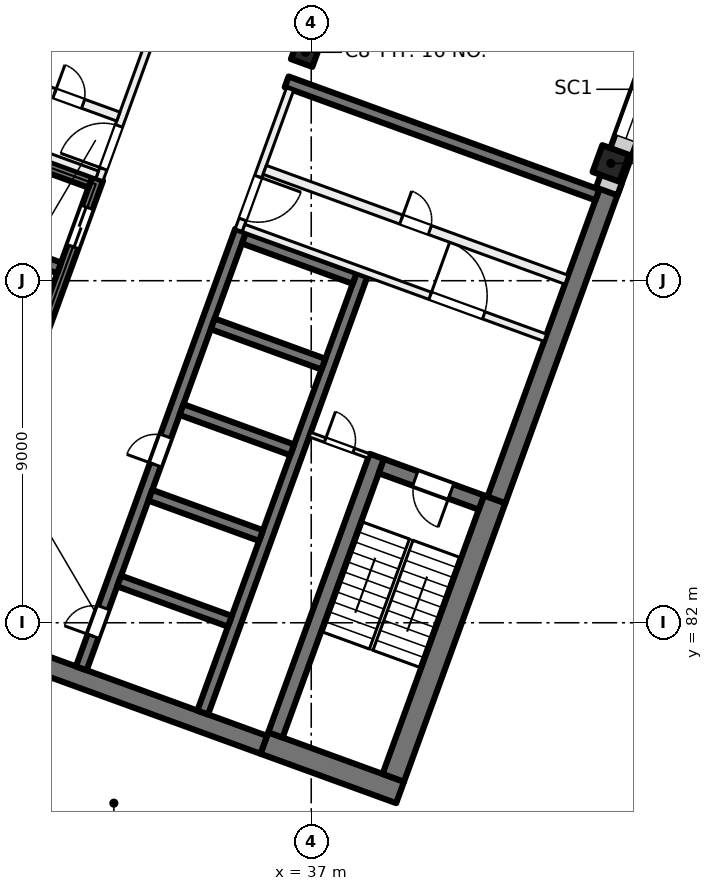
"""IFC4 building model, lengths in metres.
Left out: names, types, materials, properties, quantities, classifications, styles, units other than length and angle.
Written with IfcOpenShell. Run it as: python <this file> out.ifc"""

import sys

from ifc_helpers import new_model, si_unit, direction, frame, frame_2d, origin, origin_2d, place, context, subcontext, project, spatial, rectangle, extrude, element, fill, save


model = new_model("IFC4")
c1 = context("Model", 3, precision=1e-05, world=origin(), true_north=direction((0.0, 1.0)))
c2 = subcontext(c1, "Body", "Model", "MODEL_VIEW")
j1 = project(units=[si_unit("LENGTHUNIT", "METRE"), si_unit("PLANEANGLEUNIT", "RADIAN")], contexts=[c1])
p1 = place(None, origin())
s1 = spatial("IfcSite", under=j1, at=p1, CompositionType="ELEMENT")
p2 = place(p1, origin())
s2 = spatial("IfcBuilding", under=s1, at=p2, CompositionType="ELEMENT")
p3 = place(p2, frame((0.0, 0.0, 224.0)))
s3 = spatial("IfcBuildingStorey", under=s2, at=p3, CompositionType="ELEMENT", Elevation=224.0)
p4 = place(p3, frame((36.849, 97.011, 0.0), z_axis=(0.0, 0.0, 1.0), x_axis=(-0.342020143326, -0.939692620786, 0.0)))
e1 = element("IfcColumn", 1, at=p4, inside=s3, PredefinedType="COLUMN", context=c2, shape_type="SweptSolid", body=[
    extrude(rectangle(XDim=0.6, YDim=0.6, at=origin_2d()), origin(), (0.0, 0.0, 1.0), 4.0),
])
p5 = place(p3, frame((44.884, 94.087, 0.0), z_axis=(0.0, 0.0, 1.0), x_axis=(-0.342020143326, -0.939692620786, 0.0)))
e2 = element("IfcColumn", 2, at=p5, inside=s3, PredefinedType="COLUMN", context=c2, shape_type="SweptSolid", body=[
    extrude(rectangle(XDim=0.75, YDim=0.75, at=origin_2d()), origin(), (0.0, 0.0, 1.0), 4.0),
])
p6 = place(p3, frame((39.338, 77.535, 0.0), z_axis=(0.0, 0.0, 1.0), x_axis=(-0.939701471648, 0.341995824804, 0.0)))
e3 = element("IfcWall", 3, at=p6, inside=s3, PredefinedType="SHEAR", context=c2, shape_type="SweptSolid", body=[
    extrude(rectangle(XDim=3.8, YDim=0.6, at=frame_2d((1.9, 0.0))), origin(), (0.0, 0.0, 1.0), 4.0),
])
p7 = place(p3, frame((35.75, 78.788, 0.0), z_axis=(0.0, 0.0, 1.0), x_axis=(-0.939692894512, 0.342019391267, 0.0)))
e4 = element("IfcWall", 4, at=p7, inside=s3, PredefinedType="SHEAR", context=c2, shape_type="SweptSolid", body=[
    extrude(rectangle(XDim=14.4, YDim=0.5, at=frame_2d((7.2, 0.0))), origin(), (0.0, 0.0, 1.0), 4.0),
])
p8 = place(p3, frame((39.159, 77.92, 0.0), z_axis=(0.0, 0.0, 1.0), x_axis=(0.342016982193, 0.939693771338, 0.0)))
e5 = element("IfcWall", 5, at=p8, inside=s3, PredefinedType="SHEAR", context=c2, shape_type="SweptSolid", body=[
    extrude(rectangle(XDim=7.8, YDim=0.6, at=frame_2d((3.9, 0.0))), origin(), (0.0, 0.0, 1.0), 4.0),
])
p9 = place(p3, frame((41.874, 85.232, 0.0), z_axis=(0.0, 0.0, 1.0), x_axis=(0.342020437038, 0.939692513883, 0.0)))
e6 = element("IfcWall", 6, at=p9, inside=s3, PredefinedType="SHEAR", context=c2, shape_type="SweptSolid", body=[
    extrude(rectangle(XDim=8.975, YDim=0.5, at=frame_2d((4.487, 0.0))), origin(), (0.0, 0.0, 1.0), 4.0),
])
p10 = place(p3, frame((36.058, 79.048, 0.0), z_axis=(0.0, 0.0, 1.0), x_axis=(0.342016982193, 0.939693771338, 0.0)))
e7 = element("IfcWall", 7, at=p10, inside=s3, PredefinedType="SHEAR", context=c2, shape_type="SweptSolid", body=[
    extrude(rectangle(XDim=7.8, YDim=0.4, at=frame_2d((3.9, 0.0))), origin(), (0.0, 0.0, 1.0), 4.0),
])
p11 = place(p3, frame((41.476, 85.164, 0.0), z_axis=(0.0, 0.0, 1.0), x_axis=(-0.939678810556, 0.342058084236, 0.0)))
e8 = element("IfcWall", 8, at=p11, inside=s3, PredefinedType="SHEAR", context=c2, shape_type="SweptSolid", body=[
    extrude(rectangle(XDim=2.8, YDim=0.4, at=frame_2d((1.4, 0.0))), origin(), (0.0, 0.0, 1.0), 4.0),
])
p12 = place(p11, frame((0.85, 0.0, 0.0)))
e9 = element("IfcOpeningElement", 9, at=p12, cuts=e8, PredefinedType="OPENING", context=c2, shape_type="SweptSolid", body=[
    extrude(rectangle(XDim=1.0, YDim=2.1, at=frame_2d((0.5, 1.05))), frame((0.0, 0.21, 0.0), z_axis=(0.0, -1.0, 0.0), x_axis=(1.0, 0.0, 0.0)), (0.0, 0.0, 1.0), 0.42),
])
p13 = place(p3, frame((30.949, 80.801, 0.0), z_axis=(0.0, 0.0, 1.0), x_axis=(0.342016684409, 0.939693879721, 0.0)))
e10 = element("IfcWall", 10, at=p13, inside=s3, PredefinedType="SHEAR", context=c2, shape_type="SweptSolid", body=[
    extrude(rectangle(XDim=12.25, YDim=0.3, at=frame_2d((6.125, 0.0))), origin(), (0.0, 0.0, 1.0), 4.0),
])
p14 = place(p13, frame((0.9, 0.0, 0.0)))
e11 = element("IfcOpeningElement", 11, at=p14, cuts=e10, PredefinedType="OPENING", context=c2, shape_type="SweptSolid", body=[
    extrude(rectangle(XDim=0.8, YDim=2.1, at=frame_2d((0.4, 1.05))), frame((0.0, 0.16, 0.0), z_axis=(0.0, -1.0, 0.0), x_axis=(1.0, 0.0, 0.0)), (0.0, 0.0, 1.0), 0.32),
])
p15 = place(p13, frame((5.7, 0.0, 0.0)))
e12 = element("IfcOpeningElement", 12, at=p15, cuts=e10, PredefinedType="OPENING", context=c2, shape_type="SweptSolid", body=[
    extrude(rectangle(XDim=0.8, YDim=2.1, at=frame_2d((0.4, 1.05))), frame((0.0, 0.16, 0.0), z_axis=(0.0, -1.0, 0.0), x_axis=(1.0, 0.0, 0.0)), (0.0, 0.0, 1.0), 0.32),
])
p16 = place(p3, frame((34.144, 79.638, 0.0), z_axis=(0.0, 0.0, 1.0), x_axis=(0.342016684409, 0.939693879721, 0.0)))
e13 = element("IfcWall", 13, at=p16, inside=s3, PredefinedType="SHEAR", context=c2, shape_type="SweptSolid", body=[
    extrude(rectangle(XDim=12.25, YDim=0.3, at=frame_2d((6.125, 0.0))), origin(), (0.0, 0.0, 1.0), 4.0),
])
p17 = place(p3, frame((34.858, 82.039, 0.0), z_axis=(0.0, 0.0, 1.0), x_axis=(-0.939689908313, 0.342027595692, 0.0)))
e14 = element("IfcWall", 14, at=p17, inside=s3, PredefinedType="SHEAR", context=c2, shape_type="SweptSolid", body=[
    extrude(rectangle(XDim=3.1, YDim=0.3, at=frame_2d((1.55, 0.0))), origin(), (0.0, 0.0, 1.0), 4.0),
])
p18 = place(p3, frame((35.679, 84.294, 0.0), z_axis=(0.0, 0.0, 1.0), x_axis=(-0.939706007505, 0.341983361377, 0.0)))
e15 = element("IfcWall", 15, at=p18, inside=s3, PredefinedType="SHEAR", context=c2, shape_type="SweptSolid", body=[
    extrude(rectangle(XDim=3.1, YDim=0.3, at=frame_2d((1.55, 0.0))), origin(), (0.0, 0.0, 1.0), 4.0),
])
for number, where, z_axis, x_axis in (
    (16, (36.5, 86.549, 0.0), (0.0, 0.0, 1.0), (-0.94, 0.342, 0.0)),
    (17, (37.321, 88.805, 0.0), (0.0, 0.0, 1.0), (-0.94, 0.342, 0.0)),
    (18, (38.142, 91.06, 0.0), (0.0, 0.0, 1.0), (-0.94, 0.342, 0.0)),
):
    element("IfcWall", number, at=place(p3, frame(where, z_axis=z_axis, x_axis=x_axis)), inside=s3, PredefinedType="SHEAR", context=c2, shape_type="SweptSolid", body=[
        extrude(rectangle(XDim=3.1, YDim=0.3, at=frame_2d((1.55, 0.0))), origin(), (0.0, 0.0, 1.0), 4.0),
    ])
p19 = place(p3, frame((27.191, 82.169, 0.0), z_axis=(0.0, 0.0, 1.0), x_axis=(0.342016684409, 0.939693879721, 0.0)))
e19 = element("IfcWall", 19, at=p19, inside=s3, PredefinedType="SHEAR", context=c2, shape_type="SweptSolid", body=[
    extrude(rectangle(XDim=12.25, YDim=0.3, at=frame_2d((6.125, 0.0))), origin(), (0.0, 0.0, 1.0), 4.0),
])
p20 = place(p19, frame((0.75, 0.0, 0.0)))
e20 = element("IfcOpeningElement", 20, at=p20, cuts=e19, PredefinedType="OPENING", context=c2, shape_type="SweptSolid", body=[
    extrude(rectangle(XDim=1.1, YDim=2.1, at=frame_2d((0.55, 1.05))), frame((0.0, 0.16, 0.0), z_axis=(0.0, -1.0, 0.0), x_axis=(1.0, 0.0, 0.0)), (0.0, 0.0, 1.0), 0.32),
])
p21 = place(p19, frame((3.15, 0.0, 0.0)))
e21 = element("IfcOpeningElement", 21, at=p21, cuts=e19, PredefinedType="OPENING", context=c2, shape_type="SweptSolid", body=[
    extrude(rectangle(XDim=1.1, YDim=2.1, at=frame_2d((0.55, 1.05))), frame((0.0, 0.16, 0.0), z_axis=(0.0, -1.0, 0.0), x_axis=(1.0, 0.0, 0.0)), (0.0, 0.0, 1.0), 0.32),
])
p22 = place(p19, frame((5.55, 0.0, 0.0)))
e22 = element("IfcOpeningElement", 22, at=p22, cuts=e19, PredefinedType="OPENING", context=c2, shape_type="SweptSolid", body=[
    extrude(rectangle(XDim=1.1, YDim=2.1, at=frame_2d((0.55, 1.05))), frame((0.0, 0.16, 0.0), z_axis=(0.0, -1.0, 0.0), x_axis=(1.0, 0.0, 0.0)), (0.0, 0.0, 1.0), 0.32),
])
p23 = place(p19, frame((10.35, 0.0, 0.0)))
e23 = element("IfcOpeningElement", 23, at=p23, cuts=e19, PredefinedType="OPENING", context=c2, shape_type="SweptSolid", body=[
    extrude(rectangle(XDim=1.1, YDim=2.1, at=frame_2d((0.55, 1.05))), frame((0.0, 0.16, 0.0), z_axis=(0.0, -1.0, 0.0), x_axis=(1.0, 0.0, 0.0)), (0.0, 0.0, 1.0), 0.32),
])
for number, where, z_axis, x_axis in (
    (24, (30.367, 91.336, 0.0), (0.0, 0.0, 1.0), (-0.94, 0.342, 0.0)),
    (25, (31.188, 93.591, 0.0), (0.0, 0.0, 1.0), (-0.94, 0.342, 0.0)),
):
    element("IfcWall", number, at=place(p3, frame(where, z_axis=z_axis, x_axis=x_axis)), inside=s3, PredefinedType="SHEAR", context=c2, shape_type="SweptSolid", body=[
        extrude(rectangle(XDim=3.1, YDim=0.3, at=frame_2d((1.55, 0.0))), origin(), (0.0, 0.0, 1.0), 4.0),
    ])
p24 = place(p3, frame((44.529, 93.258, 0.0), z_axis=(0.0, 0.0, 1.0), x_axis=(-0.9396917844, 0.342022441267, 0.0)))
e26 = element("IfcWall", 26, at=p24, inside=s3, PredefinedType="SHEAR", context=c2, shape_type="SweptSolid", body=[
    extrude(rectangle(XDim=8.7, YDim=0.3, at=frame_2d((4.35, 0.0))), origin(), (0.0, 0.0, 1.0), 4.0),
])
p25 = place(p3, frame((52.212, 113.783, 0.0), z_axis=(0.0, 0.0, 1.0), x_axis=(-0.34202521188, -0.939690775968, 0.0)))
e27 = element("IfcWall", 27, at=p25, inside=s3, PredefinedType="SOLIDWALL", context=c2, shape_type="SweptSolid", body=[
    extrude(rectangle(XDim=21.745, YDim=0.6, at=frame_2d((10.873, 0.0))), origin(), (0.0, 0.0, 1.0), 3.625),
])
p26 = place(p25, frame((3.765, 0.0, 0.9)))
e28 = element("IfcOpeningElement", 28, at=p26, cuts=e27, PredefinedType="OPENING", context=c2, shape_type="SweptSolid", body=[
    extrude(rectangle(XDim=3.0, YDim=2.4, at=frame_2d((1.5, 1.2))), frame((0.0, 0.31, 0.0), z_axis=(0.0, -1.0, 0.0), x_axis=(1.0, 0.0, 0.0)), (0.0, 0.0, 1.0), 0.62),
])
p27 = place(p25, frame((8.265, 0.0, 0.9)))
e29 = element("IfcOpeningElement", 29, at=p27, cuts=e27, PredefinedType="OPENING", context=c2, shape_type="SweptSolid", body=[
    extrude(rectangle(XDim=3.0, YDim=2.4, at=frame_2d((1.5, 1.2))), frame((0.0, 0.31, 0.0), z_axis=(0.0, -1.0, 0.0), x_axis=(1.0, 0.0, 0.0)), (0.0, 0.0, 1.0), 0.62),
])
p28 = place(p25, frame((12.765, 0.0, 0.9)))
e30 = element("IfcOpeningElement", 30, at=p28, cuts=e27, PredefinedType="OPENING", context=c2, shape_type="SweptSolid", body=[
    extrude(rectangle(XDim=3.0, YDim=2.4, at=frame_2d((1.5, 1.2))), frame((0.0, 0.31, 0.0), z_axis=(0.0, -1.0, 0.0), x_axis=(1.0, 0.0, 0.0)), (0.0, 0.0, 1.0), 0.62),
])
p29 = place(p25, frame((17.265, 0.0, 0.9)))
e31 = element("IfcOpeningElement", 31, at=p29, cuts=e27, PredefinedType="OPENING", context=c2, shape_type="SweptSolid", body=[
    extrude(rectangle(XDim=3.0, YDim=2.4, at=frame_2d((1.5, 1.2))), frame((0.0, 0.31, 0.0), z_axis=(0.0, -1.0, 0.0), x_axis=(1.0, 0.0, 0.0)), (0.0, 0.0, 1.0), 0.62),
])
p30 = place(p3, frame((31.427, 93.663, 0.0), z_axis=(0.0, 0.0, 1.0), x_axis=(0.342030870568, 0.93968871632, 0.0)))
e32 = element("IfcWall", 32, at=p30, inside=s3, PredefinedType="PARTITIONING", context=c2, shape_type="SweptSolid", body=[
    extrude(rectangle(XDim=3.95, YDim=0.2, at=frame_2d((1.975, 0.0))), origin(), (0.0, 0.0, 1.0), 3.625),
])
p31 = place(p30, frame((0.3, 0.0, 0.0)))
e33 = element("IfcOpeningElement", 33, at=p31, cuts=e32, PredefinedType="OPENING", context=c2, shape_type="SweptSolid", body=[
    extrude(rectangle(XDim=1.2, YDim=2.1, at=frame_2d((0.6, 1.05))), frame((0.0, 0.11, 0.0), z_axis=(0.0, -1.0, 0.0), x_axis=(1.0, 0.0, 0.0)), (0.0, 0.0, 1.0), 0.22),
])
p32 = place(p3, frame((23.427, 96.682, 0.0), z_axis=(0.0, 0.0, 1.0), x_axis=(0.939690465531, -0.342026064782, 0.0)))
e34 = element("IfcWall", 34, at=p32, inside=s3, PredefinedType="PARTITIONING", context=c2, shape_type="SweptSolid", body=[
    extrude(rectangle(XDim=8.45, YDim=0.2, at=frame_2d((4.225, 0.0))), origin(), (0.0, 0.0, 1.0), 3.625),
])
p33 = place(p32, frame((1.725, 0.0, 0.0)))
e35 = element("IfcOpeningElement", 35, at=p33, cuts=e34, PredefinedType="OPENING", context=c2, shape_type="SweptSolid", body=[
    extrude(rectangle(XDim=1.5, YDim=2.1, at=frame_2d((0.75, 1.05))), frame((0.0, 0.11, 0.0), z_axis=(0.0, -1.0, 0.0), x_axis=(1.0, 0.0, 0.0)), (0.0, 0.0, 1.0), 0.22),
])
p34 = place(p3, frame((23.983, 98.208, 0.0), z_axis=(0.0, 0.0, 1.0), x_axis=(0.939699751196, -0.342000552051, 0.0)))
e36 = element("IfcWall", 36, at=p34, inside=s3, PredefinedType="PARTITIONING", context=c2, shape_type="SweptSolid", body=[
    extrude(rectangle(XDim=8.45, YDim=0.25, at=frame_2d((4.225, 0.0))), origin(), (0.0, 0.0, 1.0), 3.625),
])
p35 = place(p34, frame((6.665, 0.0, 0.0)))
e37 = element("IfcOpeningElement", 37, at=p35, cuts=e36, PredefinedType="OPENING", context=c2, shape_type="SweptSolid", body=[
    extrude(rectangle(XDim=0.8, YDim=2.1, at=frame_2d((0.4, 1.05))), frame((0.0, 0.135, 0.0), z_axis=(0.0, -1.0, 0.0), x_axis=(1.0, 0.0, 0.0)), (0.0, 0.0, 1.0), 0.27),
])
p36 = place(p34, frame((2.39, 0.0, 0.0)))
e38 = element("IfcOpeningElement", 38, at=p36, cuts=e36, PredefinedType="OPENING", context=c2, shape_type="SweptSolid", body=[
    extrude(rectangle(XDim=0.8, YDim=2.1, at=frame_2d((0.4, 1.05))), frame((0.0, 0.135, 0.0), z_axis=(0.0, -1.0, 0.0), x_axis=(1.0, 0.0, 0.0)), (0.0, 0.0, 1.0), 0.27),
])
p37 = place(p3, frame((36.443, 96.041, 0.0), z_axis=(0.0, 0.0, 1.0), x_axis=(-0.341996156931, -0.939701350773, 0.0)))
e39 = element("IfcWall", 39, at=p37, inside=s3, PredefinedType="PARTITIONING", context=c2, shape_type="SweptSolid", body=[
    extrude(rectangle(XDim=3.95, YDim=0.2, at=frame_2d((1.975, 0.0))), origin(), (0.0, 0.0, 1.0), 3.625),
])
p38 = place(p37, frame((2.45, 0.0, 0.0)))
e40 = element("IfcOpeningElement", 40, at=p38, cuts=e39, PredefinedType="OPENING", context=c2, shape_type="SweptSolid", body=[
    extrude(rectangle(XDim=1.2, YDim=2.1, at=frame_2d((0.6, 1.05))), frame((0.0, 0.11, 0.0), z_axis=(0.0, -1.0, 0.0), x_axis=(1.0, 0.0, 0.0)), (0.0, 0.0, 1.0), 0.22),
])
p39 = place(p3, frame((35.22, 92.389, 0.0), z_axis=(0.0, 0.0, 1.0), x_axis=(0.939690465531, -0.342026064782, 0.0)))
e41 = element("IfcWall", 41, at=p39, inside=s3, PredefinedType="PARTITIONING", context=c2, shape_type="SweptSolid", body=[
    extrude(rectangle(XDim=8.45, YDim=0.2, at=frame_2d((4.225, 0.0))), origin(), (0.0, 0.0, 1.0), 3.625),
])
p40 = place(p39, frame((5.225, 0.0, 0.0)))
e42 = element("IfcOpeningElement", 42, at=p40, cuts=e41, PredefinedType="OPENING", context=c2, shape_type="SweptSolid", body=[
    extrude(rectangle(XDim=1.5, YDim=2.1, at=frame_2d((0.75, 1.05))), frame((0.0, 0.11, 0.0), z_axis=(0.0, -1.0, 0.0), x_axis=(1.0, 0.0, 0.0)), (0.0, 0.0, 1.0), 0.22),
])
p41 = place(p3, frame((35.776, 93.916, 0.0), z_axis=(0.0, 0.0, 1.0), x_axis=(0.939690465531, -0.342026064782, 0.0)))
e43 = element("IfcWall", 43, at=p41, inside=s3, PredefinedType="PARTITIONING", context=c2, shape_type="SweptSolid", body=[
    extrude(rectangle(XDim=8.45, YDim=0.25, at=frame_2d((4.225, 0.0))), origin(), (0.0, 0.0, 1.0), 3.625),
])
p42 = place(p41, frame((3.825, 0.0, 0.0)))
e44 = element("IfcOpeningElement", 44, at=p42, cuts=e43, PredefinedType="OPENING", context=c2, shape_type="SweptSolid", body=[
    extrude(rectangle(XDim=0.8, YDim=2.1, at=frame_2d((0.4, 1.05))), frame((0.0, 0.135, 0.0), z_axis=(0.0, -1.0, 0.0), x_axis=(1.0, 0.0, 0.0)), (0.0, 0.0, 1.0), 0.27),
])
p43 = place(p3, frame((36.966, 86.952, 0.0), z_axis=(0.0, 0.0, 1.0), x_axis=(0.939672407396, -0.342075674051, 0.0)))
e45 = element("IfcWall", 45, at=p43, inside=s3, PredefinedType="PARTITIONING", context=c2, shape_type="SweptSolid", body=[
    extrude(rectangle(XDim=1.65, YDim=0.125, at=frame_2d((0.825, 0.0))), origin(), (0.0, 0.0, 1.0), 3.625),
])
p44 = place(p43, frame((0.425, 0.0, 0.0)))
e46 = element("IfcOpeningElement", 46, at=p44, cuts=e45, PredefinedType="OPENING", context=c2, shape_type="SweptSolid", body=[
    extrude(rectangle(XDim=0.8, YDim=2.1, at=frame_2d((0.4, 1.05))), frame((0.0, 0.073, 0.0), z_axis=(0.0, -1.0, 0.0), x_axis=(1.0, 0.0, 0.0)), (0.0, 0.0, 1.0), 0.145),
])
p45 = place(p29, origin())
e47 = element("IfcWindow", 47, at=p45, inside=s3, PartitioningType="SINGLE_PANEL", PredefinedType="WINDOW", context=c2, shape_type="SweptSolid", body=[
    extrude(rectangle(XDim=3.0, YDim=2.4, at=frame_2d((1.5, 1.2))), frame((0.0, 0.03, 0.0), z_axis=(0.0, -1.0, 0.0), x_axis=(1.0, 0.0, 0.0)), (0.0, 0.0, 1.0), 0.06),
])
fill(e31, e47)
p46 = place(p23, origin())
e48 = element("IfcDoor", 48, at=p46, inside=s3, OperationType="DOUBLE_DOOR_SLIDING", PredefinedType="DOOR", context=c2, shape_type="SweptSolid", body=[
    extrude(rectangle(XDim=1.1, YDim=2.1, at=frame_2d((0.55, 1.05))), frame((0.0, 0.025, 0.0), z_axis=(0.0, -1.0, 0.0), x_axis=(1.0, 0.0, 0.0)), (0.0, 0.0, 1.0), 0.05),
])
fill(e23, e48)
p47 = place(p14, origin())
e49 = element("IfcDoor", 49, at=p47, inside=s3, OperationType="SINGLE_SWING_LEFT", PredefinedType="DOOR", context=c2, shape_type="SweptSolid", body=[
    extrude(rectangle(XDim=0.8, YDim=2.1, at=frame_2d((0.4, 1.05))), frame((0.0, 0.025, 0.0), z_axis=(0.0, -1.0, 0.0), x_axis=(1.0, 0.0, 0.0)), (0.0, 0.0, 1.0), 0.05),
])
fill(e11, e49)
p48 = place(p15, origin())
e50 = element("IfcDoor", 50, at=p48, inside=s3, OperationType="SINGLE_SWING_RIGHT", PredefinedType="DOOR", context=c2, shape_type="SweptSolid", body=[
    extrude(rectangle(XDim=0.8, YDim=2.1, at=frame_2d((0.4, 1.05))), frame((0.0, 0.025, 0.0), z_axis=(0.0, -1.0, 0.0), x_axis=(1.0, 0.0, 0.0)), (0.0, 0.0, 1.0), 0.05),
])
fill(e12, e50)
p49 = place(p31, origin())
e51 = element("IfcDoor", 51, at=p49, inside=s3, OperationType="DOUBLE_DOOR_SINGLE_SWING", PredefinedType="DOOR", context=c2, shape_type="SweptSolid", body=[
    extrude(rectangle(XDim=1.2, YDim=2.1, at=frame_2d((0.6, 1.05))), frame((0.0, 0.025, 0.0), z_axis=(0.0, -1.0, 0.0), x_axis=(1.0, 0.0, 0.0)), (0.0, 0.0, 1.0), 0.05),
])
fill(e33, e51)
p50 = place(p35, origin())
e52 = element("IfcDoor", 52, at=p50, inside=s3, OperationType="SINGLE_SWING_LEFT", PredefinedType="DOOR", context=c2, shape_type="SweptSolid", body=[
    extrude(rectangle(XDim=0.8, YDim=2.1, at=frame_2d((0.4, 1.05))), frame((0.0, 0.025, 0.0), z_axis=(0.0, -1.0, 0.0), x_axis=(1.0, 0.0, 0.0)), (0.0, 0.0, 1.0), 0.05),
])
fill(e37, e52)
p51 = place(p38, origin())
e53 = element("IfcDoor", 53, at=p51, inside=s3, OperationType="DOUBLE_DOOR_SINGLE_SWING", PredefinedType="DOOR", context=c2, shape_type="SweptSolid", body=[
    extrude(rectangle(XDim=1.2, YDim=2.1, at=frame_2d((0.6, 1.05))), frame((0.0, 0.025, 0.0), z_axis=(0.0, -1.0, 0.0), x_axis=(1.0, 0.0, 0.0)), (0.0, 0.0, 1.0), 0.05),
])
fill(e40, e53)
p52 = place(p40, origin())
e54 = element("IfcDoor", 54, at=p52, inside=s3, OperationType="DOUBLE_DOOR_SINGLE_SWING", PredefinedType="DOOR", context=c2, shape_type="SweptSolid", body=[
    extrude(rectangle(XDim=1.5, YDim=2.1, at=frame_2d((0.75, 1.05))), frame((0.0, 0.025, 0.0), z_axis=(0.0, -1.0, 0.0), x_axis=(1.0, 0.0, 0.0)), (0.0, 0.0, 1.0), 0.05),
])
fill(e42, e54)
p53 = place(p12, origin())
e55 = element("IfcDoor", 55, at=p53, inside=s3, OperationType="SINGLE_SWING_RIGHT", PredefinedType="DOOR", context=c2, shape_type="SweptSolid", body=[
    extrude(rectangle(XDim=1.0, YDim=2.1, at=frame_2d((0.5, 1.05))), frame((0.0, 0.025, 0.0), z_axis=(0.0, -1.0, 0.0), x_axis=(1.0, 0.0, 0.0)), (0.0, 0.0, 1.0), 0.05),
])
fill(e9, e55)
p54 = place(p44, origin())
e56 = element("IfcDoor", 56, at=p54, inside=s3, OperationType="SINGLE_SWING_LEFT", PredefinedType="DOOR", context=c2, shape_type="SweptSolid", body=[
    extrude(rectangle(XDim=0.8, YDim=2.1, at=frame_2d((0.4, 1.05))), frame((0.0, 0.025, 0.0), z_axis=(0.0, -1.0, 0.0), x_axis=(1.0, 0.0, 0.0)), (0.0, 0.0, 1.0), 0.05),
])
fill(e46, e56)
p55 = place(p42, origin())
e57 = element("IfcDoor", 57, at=p55, inside=s3, OperationType="SINGLE_SWING_RIGHT", PredefinedType="DOOR", context=c2, shape_type="SweptSolid", body=[
    extrude(rectangle(XDim=0.8, YDim=2.1, at=frame_2d((0.4, 1.05))), frame((0.0, 0.025, 0.0), z_axis=(0.0, -1.0, 0.0), x_axis=(1.0, 0.0, 0.0)), (0.0, 0.0, 1.0), 0.05),
])
fill(e44, e57)
save(model, sys.argv[1])
